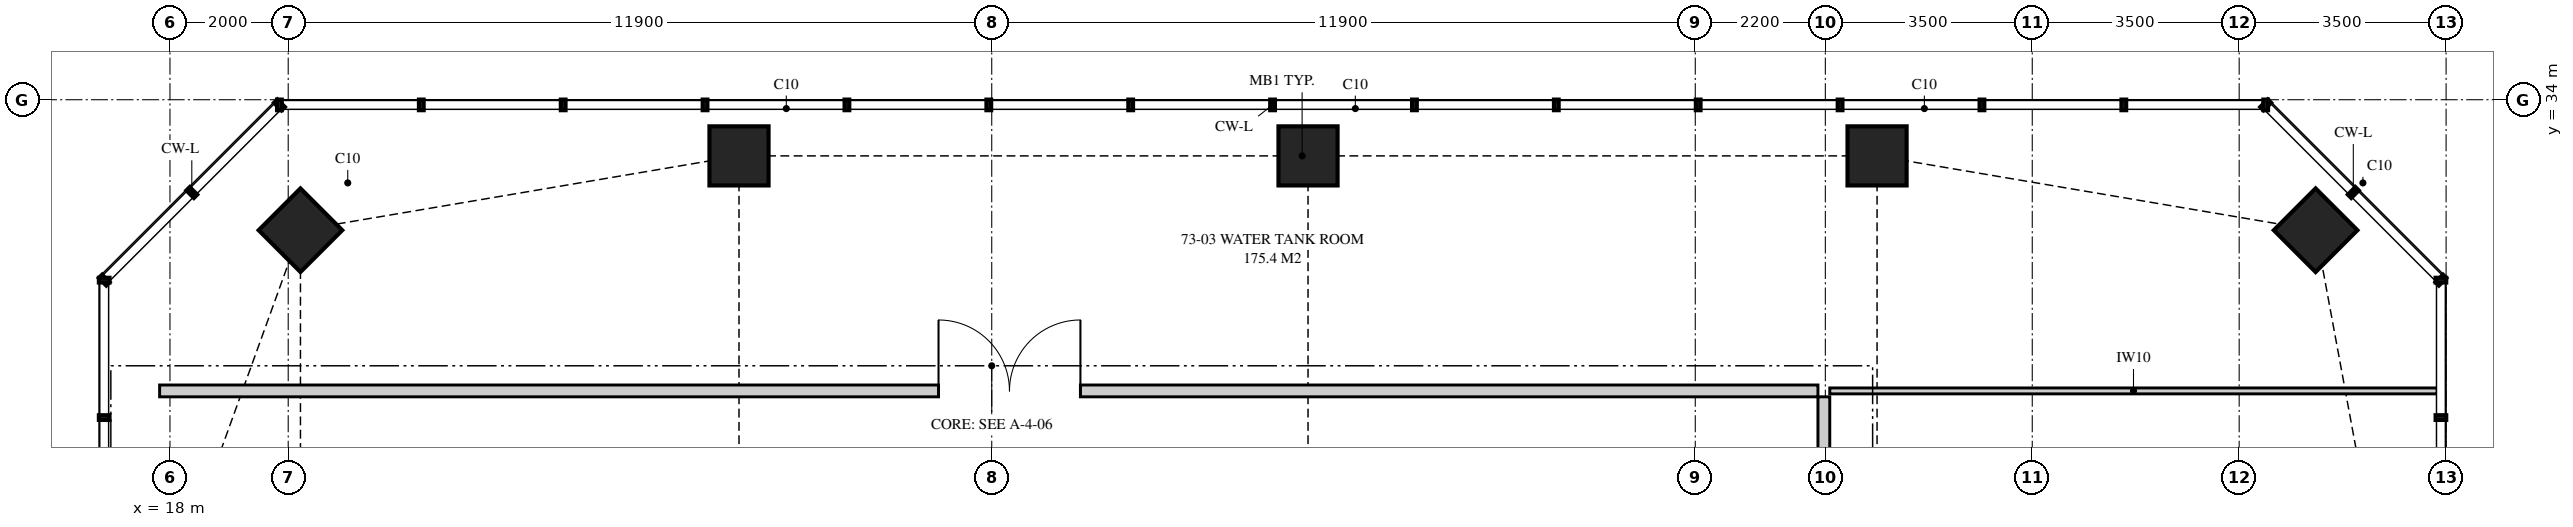
"""IFC4 building model, lengths in metres.
Left out: names, types, materials, properties, quantities, classifications, styles, units other than length and angle.
Written with IfcOpenShell. Run it as: python <this file> out.ifc"""

import sys

from ifc_helpers import new_model, si_unit, direction, frame, frame_2d, origin, origin_2d, place, context, subcontext, project, spatial, polyline, rectangle, outline, extrude, element, fill, save


model = new_model("IFC4")
c1 = context("Model", 3, precision=1e-05, world=origin(), true_north=direction((0.0, 1.0)))
c2 = subcontext(c1, "Body", "Model", "MODEL_VIEW")
j1 = project(units=[si_unit("LENGTHUNIT", "METRE"), si_unit("PLANEANGLEUNIT", "RADIAN")], contexts=[c1])
p1 = place(None, origin())
s1 = spatial("IfcSite", under=j1, at=p1, CompositionType="ELEMENT")
p2 = place(p1, origin())
s2 = spatial("IfcBuilding", under=s1, at=p2, CompositionType="ELEMENT")
p3 = place(p2, frame((0.0, 0.0, 267.75)))
s3 = spatial("IfcBuildingStorey", under=s2, at=p3, CompositionType="ELEMENT", Elevation=267.75)
for number, where, z_axis, x_axis in (
    (1, (54.293, 31.793, 0.0), (0.0, 0.0, 1.0), (0.707, 0.707, 0.0)),
    (2, (46.875, 33.05, 0.0), (0.0, 0.0, 1.0), (1.0, 0.0, 0.0)),
    (3, (37.25, 33.05, 0.0), (0.0, 0.0, 1.0), (1.0, 0.0, 0.0)),
    (4, (27.625, 33.05, 0.0), (0.0, 0.0, 1.0), (1.0, 0.0, 0.0)),
    (5, (20.207, 31.793, 0.0), (0.0, 0.0, 1.0), (0.707, 0.707, 0.0)),
):
    element("IfcColumn", number, at=place(p3, frame(where, z_axis=z_axis, x_axis=x_axis)), inside=s3, PredefinedType="COLUMN", context=c2, shape_type="SweptSolid", body=[
        extrude(rectangle(XDim=1.0, YDim=1.0, at=origin_2d()), origin(), (0.0, 0.0, 1.0), 5.0),
    ])
p4 = place(p3, frame((17.825, 29.075, 0.0), z_axis=(0.0, 0.0, 1.0), x_axis=(1.0, 0.0, 0.0)))
e6 = element("IfcWall", 6, at=p4, inside=s3, PredefinedType="PARTITIONING", context=c2, shape_type="SweptSolid", body=[
    extrude(outline(polyline([(0.0, 0.0), (28.05, 0.0), (28.05, 4.72), (28.05, 4.12), (27.74, 4.12), (27.74, 4.72), (20.735, 4.72), (20.735, 4.12), (18.115, 4.12), (18.115, 4.72), (11.11, 4.72), (11.11, 4.12), (8.49, 4.12), (8.49, 4.72), (3.692, 4.72), (3.692, 4.12), (2.367, 4.12), (2.367, 3.5), (0.431, 3.5), (0.431, 4.72), (0.0, 4.72), (0.0, 0.0)])), frame((0.0, 0.1, 0.0), z_axis=(0.0, -1.0, 0.0), x_axis=(1.0, 0.0, 0.0)), (0.0, 0.0, 1.0), 0.2),
])
p5 = place(p4, frame((13.175, 0.0, 0.0)))
e7 = element("IfcOpeningElement", 7, at=p5, cuts=e6, PredefinedType="OPENING", context=c2, shape_type="SweptSolid", body=[
    extrude(rectangle(XDim=2.4, YDim=2.4, at=frame_2d((1.2, 1.2))), frame((0.0, 0.11, 0.0), z_axis=(0.0, -1.0, 0.0), x_axis=(1.0, 0.0, 0.0)), (0.0, 0.0, 1.0), 0.22),
])
p6 = place(p3, frame((45.975, 27.175, 0.0), z_axis=(0.0, 0.0, 1.0), x_axis=(0.0, 1.0, 0.0)))
e8 = element("IfcWall", 8, at=p6, inside=s3, PredefinedType="PARTITIONING", context=c2, shape_type="SweptSolid", body=[
    extrude(outline(polyline([(0.0, 0.0), (1.8, 0.0), (1.8, 4.72), (1.8, 4.12), (0.0, 4.12), (0.0, 4.72), (0.0, 0.0)])), frame((0.0, 0.1, 0.0), z_axis=(0.0, -1.0, 0.0), x_axis=(1.0, 0.0, 0.0)), (0.0, 0.0, 1.0), 0.2),
])
p7 = place(p3, frame((46.075, 29.075, 0.0), z_axis=(0.0, 0.0, 1.0), x_axis=(1.0, 0.0, 0.0)))
e9 = element("IfcWall", 9, at=p7, inside=s3, PredefinedType="PARTITIONING", context=c2, shape_type="SweptSolid", body=[
    extrude(outline(polyline([(0.0, 0.0), (10.275, 0.0), (10.275, 4.72), (9.595, 4.72), (9.595, 3.5), (7.846, 3.5), (7.846, 4.72), (2.06, 4.72), (2.06, 4.12), (0.0, 4.12), (0.0, 4.72), (0.0, 0.0)])), frame((0.0, 0.05, 0.0), z_axis=(0.0, -1.0, 0.0), x_axis=(1.0, 0.0, 0.0)), (0.0, 0.0, 1.0), 0.1),
])
p8 = place(p5, origin())
e10 = element("IfcDoor", 10, at=p8, inside=s3, OperationType="DOUBLE_DOOR_SINGLE_SWING", PredefinedType="DOOR", context=c2, shape_type="SweptSolid", body=[
    extrude(rectangle(XDim=2.4, YDim=2.4, at=frame_2d((1.2, 1.2))), frame((0.0, 0.025, 0.0), z_axis=(0.0, -1.0, 0.0), x_axis=(1.0, 0.0, 0.0)), (0.0, 0.0, 1.0), 0.05),
])
fill(e7, e10)
save(model, sys.argv[1])
